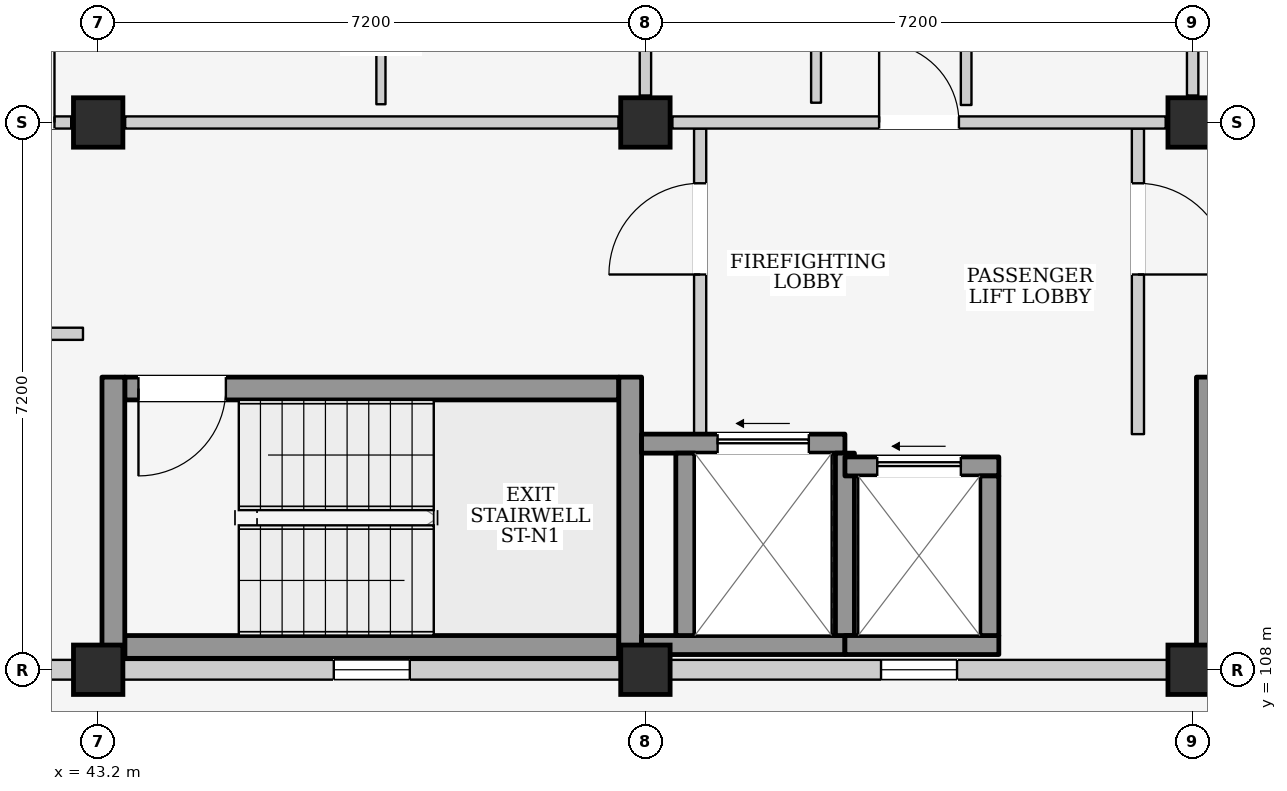
"""IFC4 building model, lengths in metres.
Left out: names, types, materials, properties, quantities, classifications, styles, units other than length and angle.
Written with IfcOpenShell. Run it as: python <this file> out.ifc"""

import sys

from ifc_helpers import new_model, si_unit, direction, frame, frame_2d, origin, origin_2d, place, context, subcontext, project, spatial, rectangle, extrude, element, fill, save


model = new_model("IFC4")
c1 = context("Model", 3, precision=1e-05, world=origin(), true_north=direction((0.0, 1.0)))
c2 = subcontext(c1, "Body", "Model", "MODEL_VIEW")
j1 = project(units=[si_unit("LENGTHUNIT", "METRE"), si_unit("PLANEANGLEUNIT", "RADIAN")], contexts=[c1])
p1 = place(None, origin())
s1 = spatial("IfcSite", under=j1, at=p1, CompositionType="ELEMENT")
p2 = place(p1, origin())
s2 = spatial("IfcBuilding", under=s1, at=p2, CompositionType="ELEMENT")
p3 = place(p2, frame((0.0, 0.0, 18.6)))
s3 = spatial("IfcBuildingStorey", under=s2, at=p3, CompositionType="ELEMENT", Elevation=18.6)
for number, where, z_axis, x_axis in (
    (1, (43.2, 108.0, 0.0), (0.0, 0.0, 1.0), (1.0, 0.0, 0.0)),
    (2, (43.2, 115.2, 0.0), (0.0, 0.0, 1.0), (1.0, 0.0, 0.0)),
    (3, (50.4, 108.0, 0.0), (0.0, 0.0, 1.0), (1.0, 0.0, 0.0)),
    (4, (50.4, 115.2, 0.0), (0.0, 0.0, 1.0), (1.0, 0.0, 0.0)),
    (5, (57.6, 108.0, 0.0), (0.0, 0.0, 1.0), (1.0, 0.0, 0.0)),
    (6, (57.6, 115.2, 0.0), (0.0, 0.0, 1.0), (1.0, 0.0, 0.0)),
):
    element("IfcColumn", number, at=place(p3, frame(where, z_axis=z_axis, x_axis=x_axis)), inside=s3, PredefinedType="COLUMN", context=c2, shape_type="SweptSolid", body=[
        extrude(rectangle(XDim=0.65, YDim=0.65, at=origin_2d()), origin(), (0.0, 0.0, 1.0), 3.3),
    ])
p4 = place(p3, frame((36.325, 108.0, 0.0), z_axis=(0.0, 0.0, 1.0), x_axis=(1.0, 0.0, 0.0)))
e7 = element("IfcWall", 7, at=p4, inside=s3, PredefinedType="ELEMENTEDWALL", context=c2, shape_type="SweptSolid", body=[
    extrude(rectangle(XDim=6.55, YDim=0.26, at=frame_2d((3.275, 0.0))), origin(), (0.0, 0.0, 1.0), 2.395),
])
p5 = place(p4, frame((2.525, 0.0, 0.0)))
e8 = element("IfcOpeningElement", 8, at=p5, cuts=e7, PredefinedType="OPENING", context=c2, shape_type="SweptSolid", body=[
    extrude(rectangle(XDim=1.5, YDim=2.12, at=frame_2d((0.75, 1.06))), frame((0.0, 0.145, 0.0), z_axis=(0.0, -1.0, 0.0), x_axis=(1.0, 0.0, 0.0)), (0.0, 0.0, 1.0), 0.29),
])
p6 = place(p3, frame((43.525, 108.0, 0.0), z_axis=(0.0, 0.0, 1.0), x_axis=(1.0, 0.0, 0.0)))
e9 = element("IfcWall", 9, at=p6, inside=s3, PredefinedType="ELEMENTEDWALL", context=c2, shape_type="SweptSolid", body=[
    extrude(rectangle(XDim=6.55, YDim=0.26, at=frame_2d((3.275, 0.0))), origin(), (0.0, 0.0, 1.0), 2.395),
])
p7 = place(p6, frame((2.775, 0.0, 1.2)))
e10 = element("IfcOpeningElement", 10, at=p7, cuts=e9, PredefinedType="OPENING", context=c2, shape_type="SweptSolid", body=[
    extrude(rectangle(XDim=1.0, YDim=0.9, at=frame_2d((0.5, 0.45))), frame((0.0, 0.145, 0.0), z_axis=(0.0, -1.0, 0.0), x_axis=(1.0, 0.0, 0.0)), (0.0, 0.0, 1.0), 0.29),
])
p8 = place(p3, frame((50.725, 108.0, 0.0), z_axis=(0.0, 0.0, 1.0), x_axis=(1.0, 0.0, 0.0)))
e11 = element("IfcWall", 11, at=p8, inside=s3, PredefinedType="ELEMENTEDWALL", context=c2, shape_type="SweptSolid", body=[
    extrude(rectangle(XDim=6.55, YDim=0.26, at=frame_2d((3.275, 0.0))), origin(), (0.0, 0.0, 1.0), 2.395),
])
p9 = place(p8, frame((2.775, 0.0, 1.2)))
e12 = element("IfcOpeningElement", 12, at=p9, cuts=e11, PredefinedType="OPENING", context=c2, shape_type="SweptSolid", body=[
    extrude(rectangle(XDim=1.0, YDim=0.9, at=frame_2d((0.5, 0.45))), frame((0.0, 0.145, 0.0), z_axis=(0.0, -1.0, 0.0), x_axis=(1.0, 0.0, 0.0)), (0.0, 0.0, 1.0), 0.29),
])
p10 = place(p3, frame((43.55, 108.3, 0.0), z_axis=(0.0, 0.0, 1.0), x_axis=(1.0, 0.0, 0.0)))
e13 = element("IfcWall", 13, at=p10, inside=s3, PredefinedType="SHEAR", context=c2, shape_type="SweptSolid", body=[
    extrude(rectangle(XDim=6.5, YDim=0.3, at=frame_2d((3.25, 0.0))), origin(), (0.0, 0.0, 1.0), 3.06),
])
p11 = place(p3, frame((43.55, 111.7, 0.0), z_axis=(0.0, 0.0, 1.0), x_axis=(1.0, 0.0, 0.0)))
e14 = element("IfcWall", 14, at=p11, inside=s3, PredefinedType="SHEAR", context=c2, shape_type="SweptSolid", body=[
    extrude(rectangle(XDim=6.5, YDim=0.3, at=frame_2d((3.25, 0.0))), origin(), (0.0, 0.0, 1.0), 3.06),
])
p12 = place(p11, frame((0.18, 0.0, 0.0)))
e15 = element("IfcOpeningElement", 15, at=p12, cuts=e14, PredefinedType="OPENING", context=c2, shape_type="SweptSolid", body=[
    extrude(rectangle(XDim=1.15, YDim=2.2, at=frame_2d((0.575, 1.1))), frame((0.0, 0.165, 0.0), z_axis=(0.0, -1.0, 0.0), x_axis=(1.0, 0.0, 0.0)), (0.0, 0.0, 1.0), 0.33),
])
for number, where, z_axis, x_axis in (
    (16, (43.4, 108.15, 0.0), (0.0, 0.0, 1.0), (0.0, 1.0, 0.0)),
    (17, (50.2, 108.15, 0.0), (0.0, 0.0, 1.0), (0.0, 1.0, 0.0)),
):
    element("IfcWall", number, at=place(p3, frame(where, z_axis=z_axis, x_axis=x_axis)), inside=s3, PredefinedType="SHEAR", context=c2, shape_type="SweptSolid", body=[
        extrude(rectangle(XDim=3.7, YDim=0.3, at=frame_2d((1.85, 0.0))), origin(), (0.0, 0.0, 1.0), 3.06),
    ])
p13 = place(p3, frame((51.12, 111.1, 0.0), z_axis=(0.0, 0.0, 1.0), x_axis=(0.0, 1.0, 0.0)))
e18 = element("IfcWall", 18, at=p13, inside=s3, PredefinedType="PARTITIONING", context=c2, shape_type="SweptSolid", body=[
    extrude(rectangle(XDim=4.02, YDim=0.16, at=frame_2d((2.01, 0.0))), origin(), (0.0, 0.0, 1.0), 3.06),
])
p14 = place(p13, frame((2.1, 0.0, 0.0)))
e19 = element("IfcOpeningElement", 19, at=p14, cuts=e18, PredefinedType="OPENING", context=c2, shape_type="SweptSolid", body=[
    extrude(rectangle(XDim=1.2, YDim=2.2, at=frame_2d((0.6, 1.1))), frame((0.0, 0.095, 0.0), z_axis=(0.0, -1.0, 0.0), x_axis=(1.0, 0.0, 0.0)), (0.0, 0.0, 1.0), 0.19),
])
p15 = place(p3, frame((56.88, 111.1, 0.0), z_axis=(0.0, 0.0, 1.0), x_axis=(0.0, 1.0, 0.0)))
e20 = element("IfcWall", 20, at=p15, inside=s3, PredefinedType="PARTITIONING", context=c2, shape_type="SweptSolid", body=[
    extrude(rectangle(XDim=4.02, YDim=0.16, at=frame_2d((2.01, 0.0))), origin(), (0.0, 0.0, 1.0), 3.06),
])
p16 = place(p15, frame((2.1, 0.0, 0.0)))
e21 = element("IfcOpeningElement", 21, at=p16, cuts=e20, PredefinedType="OPENING", context=c2, shape_type="SweptSolid", body=[
    extrude(rectangle(XDim=1.2, YDim=2.2, at=frame_2d((0.6, 1.1))), frame((0.0, 0.095, 0.0), z_axis=(0.0, -1.0, 0.0), x_axis=(1.0, 0.0, 0.0)), (0.0, 0.0, 1.0), 0.19),
])
p17 = place(p3, frame((50.35, 108.325, 0.0), z_axis=(0.0, 0.0, 1.0), x_axis=(1.0, 0.0, 0.0)))
e22 = element("IfcWall", 22, at=p17, inside=s3, PredefinedType="SHEAR", context=c2, shape_type="SweptSolid", body=[
    extrude(rectangle(XDim=2.675, YDim=0.25, at=frame_2d((1.337, 0.0))), origin(), (0.0, 0.0, 1.0), 3.06),
])
p18 = place(p3, frame((50.35, 110.975, 0.0), z_axis=(0.0, 0.0, 1.0), x_axis=(1.0, 0.0, 0.0)))
e23 = element("IfcWall", 23, at=p18, inside=s3, PredefinedType="SHEAR", context=c2, shape_type="SweptSolid", body=[
    extrude(rectangle(XDim=2.675, YDim=0.25, at=frame_2d((1.337, 0.0))), origin(), (0.0, 0.0, 1.0), 3.06),
])
p19 = place(p18, frame((1.0, 0.0, 0.0)))
e24 = element("IfcOpeningElement", 24, at=p19, cuts=e23, PredefinedType="OPENING", context=c2, shape_type="SweptSolid", body=[
    extrude(rectangle(XDim=1.2, YDim=2.25, at=frame_2d((0.6, 1.125))), frame((0.0, 0.14, 0.0), z_axis=(0.0, -1.0, 0.0), x_axis=(1.0, 0.0, 0.0)), (0.0, 0.0, 1.0), 0.28),
])
for number, where, z_axis, x_axis in (
    (25, (50.925, 108.45, 0.0), (0.0, 0.0, 1.0), (0.0, 1.0, 0.0)),
    (26, (53.025, 108.45, 0.0), (0.0, 0.0, 1.0), (0.0, 1.0, 0.0)),
):
    element("IfcWall", number, at=place(p3, frame(where, z_axis=z_axis, x_axis=x_axis)), inside=s3, PredefinedType="SHEAR", context=c2, shape_type="SweptSolid", body=[
        extrude(rectangle(XDim=2.4, YDim=0.25, at=frame_2d((1.2, 0.0))), origin(), (0.0, 0.0, 1.0), 3.06),
    ])
p20 = place(p3, frame((53.025, 108.325, 0.0), z_axis=(0.0, 0.0, 1.0), x_axis=(1.0, 0.0, 0.0)))
e27 = element("IfcWall", 27, at=p20, inside=s3, PredefinedType="SHEAR", context=c2, shape_type="SweptSolid", body=[
    extrude(rectangle(XDim=2.025, YDim=0.25, at=frame_2d((1.013, 0.0))), origin(), (0.0, 0.0, 1.0), 3.06),
])
p21 = place(p3, frame((53.025, 110.675, 0.0), z_axis=(0.0, 0.0, 1.0), x_axis=(1.0, 0.0, 0.0)))
e28 = element("IfcWall", 28, at=p21, inside=s3, PredefinedType="SHEAR", context=c2, shape_type="SweptSolid", body=[
    extrude(rectangle(XDim=2.025, YDim=0.25, at=frame_2d((1.013, 0.0))), origin(), (0.0, 0.0, 1.0), 3.06),
])
p22 = place(p21, frame((0.425, 0.0, 0.0)))
e29 = element("IfcOpeningElement", 29, at=p22, cuts=e28, PredefinedType="OPENING", context=c2, shape_type="SweptSolid", body=[
    extrude(rectangle(XDim=1.1, YDim=2.15, at=frame_2d((0.55, 1.075))), frame((0.0, 0.14, 0.0), z_axis=(0.0, -1.0, 0.0), x_axis=(1.0, 0.0, 0.0)), (0.0, 0.0, 1.0), 0.28),
])
p23 = place(p3, frame((54.925, 108.45, 0.0), z_axis=(0.0, 0.0, 1.0), x_axis=(0.0, 1.0, 0.0)))
e30 = element("IfcWall", 30, at=p23, inside=s3, PredefinedType="SHEAR", context=c2, shape_type="SweptSolid", body=[
    extrude(rectangle(XDim=2.1, YDim=0.25, at=frame_2d((1.05, 0.0))), origin(), (0.0, 0.0, 1.0), 3.06),
])
p24 = place(p3, frame((57.8, 108.15, 0.0), z_axis=(0.0, 0.0, 1.0), x_axis=(0.0, 1.0, 0.0)))
e31 = element("IfcWall", 31, at=p24, inside=s3, PredefinedType="SHEAR", context=c2, shape_type="SweptSolid", body=[
    extrude(rectangle(XDim=3.7, YDim=0.3, at=frame_2d((1.85, 0.0))), origin(), (0.0, 0.0, 1.0), 3.06),
])
p25 = place(p3, frame((36.355, 115.2, 0.0), z_axis=(0.0, 0.0, 1.0), x_axis=(1.0, 0.0, 0.0)))
e32 = element("IfcWall", 32, at=p25, inside=s3, PredefinedType="PARTITIONING", context=c2, shape_type="SweptSolid", body=[
    extrude(rectangle(XDim=6.49, YDim=0.16, at=frame_2d((3.245, 0.0))), origin(), (0.0, 0.0, 1.0), 2.395),
])
p26 = place(p25, frame((5.22, 0.0, 0.0)))
e33 = element("IfcOpeningElement", 33, at=p26, cuts=e32, PredefinedType="OPENING", context=c2, shape_type="SweptSolid", body=[
    extrude(rectangle(XDim=1.05, YDim=2.15, at=frame_2d((0.525, 1.075))), frame((0.0, 0.095, 0.0), z_axis=(0.0, -1.0, 0.0), x_axis=(1.0, 0.0, 0.0)), (0.0, 0.0, 1.0), 0.19),
])
p27 = place(p3, frame((43.555, 115.2, 0.0), z_axis=(0.0, 0.0, 1.0), x_axis=(1.0, 0.0, 0.0)))
e34 = element("IfcWall", 34, at=p27, inside=s3, PredefinedType="PARTITIONING", context=c2, shape_type="SweptSolid", body=[
    extrude(rectangle(XDim=6.49, YDim=0.16, at=frame_2d((3.245, 0.0))), origin(), (0.0, 0.0, 1.0), 2.395),
])
p28 = place(p3, frame((50.4, 115.555, 0.0), z_axis=(0.0, 0.0, 1.0), x_axis=(0.0, 1.0, 0.0)))
e35 = element("IfcWall", 35, at=p28, inside=s3, PredefinedType="PARTITIONING", context=c2, shape_type="SweptSolid", body=[
    extrude(rectangle(XDim=6.49, YDim=0.15, at=frame_2d((3.245, 0.0))), origin(), (0.0, 0.0, 1.0), 2.545),
])
p29 = place(p3, frame((46.92, 115.44, 0.0), z_axis=(0.0, 0.0, 1.0), x_axis=(0.0, 1.0, 0.0)))
e36 = element("IfcWall", 36, at=p29, inside=s3, PredefinedType="PARTITIONING", context=c2, shape_type="SweptSolid", body=[
    extrude(rectangle(XDim=3.04, YDim=0.12, at=frame_2d((1.52, 0.0))), origin(), (0.0, 0.0, 1.0), 3.06),
])
p30 = place(p29, frame((1.04, 0.0, 0.0)))
e37 = element("IfcOpeningElement", 37, at=p30, cuts=e36, PredefinedType="OPENING", context=c2, shape_type="SweptSolid", body=[
    extrude(rectangle(XDim=0.96, YDim=2.15, at=frame_2d((0.48, 1.075))), frame((0.0, 0.075, 0.0), z_axis=(0.0, -1.0, 0.0), x_axis=(1.0, 0.0, 0.0)), (0.0, 0.0, 1.0), 0.15),
])
p31 = place(p3, frame((50.755, 115.2, 0.0), z_axis=(0.0, 0.0, 1.0), x_axis=(1.0, 0.0, 0.0)))
e38 = element("IfcWall", 38, at=p31, inside=s3, PredefinedType="PARTITIONING", context=c2, shape_type="SweptSolid", body=[
    extrude(rectangle(XDim=6.49, YDim=0.16, at=frame_2d((3.245, 0.0))), origin(), (0.0, 0.0, 1.0), 2.395),
])
p32 = place(p31, frame((2.72, 0.0, 0.0)))
e39 = element("IfcOpeningElement", 39, at=p32, cuts=e38, PredefinedType="OPENING", context=c2, shape_type="SweptSolid", body=[
    extrude(rectangle(XDim=1.05, YDim=2.15, at=frame_2d((0.525, 1.075))), frame((0.0, 0.095, 0.0), z_axis=(0.0, -1.0, 0.0), x_axis=(1.0, 0.0, 0.0)), (0.0, 0.0, 1.0), 0.19),
])
p33 = place(p3, frame((57.6, 115.555, 0.0), z_axis=(0.0, 0.0, 1.0), x_axis=(0.0, 1.0, 0.0)))
e40 = element("IfcWall", 40, at=p33, inside=s3, PredefinedType="PARTITIONING", context=c2, shape_type="SweptSolid", body=[
    extrude(rectangle(XDim=6.49, YDim=0.15, at=frame_2d((3.245, 0.0))), origin(), (0.0, 0.0, 1.0), 2.545),
])
p34 = place(p3, frame((52.645, 115.46, 0.0), z_axis=(0.0, 0.0, 1.0), x_axis=(0.0, 1.0, 0.0)))
e41 = element("IfcWall", 41, at=p34, inside=s3, PredefinedType="PARTITIONING", context=c2, shape_type="SweptSolid", body=[
    extrude(rectangle(XDim=2.13, YDim=0.13, at=frame_2d((1.065, 0.0))), origin(), (0.0, 0.0, 1.0), 3.06),
])
p35 = place(p3, frame((54.62, 115.43, 0.0), z_axis=(0.0, 0.0, 1.0), x_axis=(0.0, 1.0, 0.0)))
e42 = element("IfcWall", 42, at=p35, inside=s3, PredefinedType="PARTITIONING", context=c2, shape_type="SweptSolid", body=[
    extrude(rectangle(XDim=2.15, YDim=0.14, at=frame_2d((1.075, 0.0))), origin(), (0.0, 0.0, 1.0), 3.06),
])
p36 = place(p3, frame((36.2, 112.42, 0.0), z_axis=(0.0, 0.0, 1.0), x_axis=(1.0, 0.0, 0.0)))
e43 = element("IfcWall", 43, at=p36, inside=s3, PredefinedType="PARTITIONING", context=c2, shape_type="SweptSolid", body=[
    extrude(rectangle(XDim=6.8, YDim=0.16, at=frame_2d((3.4, 0.0))), origin(), (0.0, 0.0, 1.0), 3.06),
])
p37 = place(p36, frame((2.93, 0.0, 0.0)))
e44 = element("IfcOpeningElement", 44, at=p37, cuts=e43, PredefinedType="OPENING", context=c2, shape_type="SweptSolid", body=[
    extrude(rectangle(XDim=0.94, YDim=2.12, at=frame_2d((0.47, 1.06))), frame((0.0, 0.095, 0.0), z_axis=(0.0, -1.0, 0.0), x_axis=(1.0, 0.0, 0.0)), (0.0, 0.0, 1.0), 0.19),
])
p38 = place(p7, origin())
e45 = element("IfcWindow", 45, at=p38, inside=s3, PartitioningType="SINGLE_PANEL", PredefinedType="WINDOW", context=c2, shape_type="SweptSolid", body=[
    extrude(rectangle(XDim=1.0, YDim=0.9, at=frame_2d((0.5, 0.45))), frame((0.0, 0.03, 0.0), z_axis=(0.0, -1.0, 0.0), x_axis=(1.0, 0.0, 0.0)), (0.0, 0.0, 1.0), 0.06),
])
fill(e10, e45)
p39 = place(p9, origin())
e46 = element("IfcWindow", 46, at=p39, inside=s3, PartitioningType="SINGLE_PANEL", PredefinedType="WINDOW", context=c2, shape_type="SweptSolid", body=[
    extrude(rectangle(XDim=1.0, YDim=0.9, at=frame_2d((0.5, 0.45))), frame((0.0, 0.03, 0.0), z_axis=(0.0, -1.0, 0.0), x_axis=(1.0, 0.0, 0.0)), (0.0, 0.0, 1.0), 0.06),
])
fill(e12, e46)
p40 = place(p12, frame((1.15, 0.0, 0.0), z_axis=(0.0, 0.0, 1.0), x_axis=(-1.0, 0.0, 0.0)))
e47 = element("IfcDoor", 47, at=p40, inside=s3, OperationType="SINGLE_SWING_RIGHT", PredefinedType="DOOR", context=c2, shape_type="SweptSolid", body=[
    extrude(rectangle(XDim=1.15, YDim=2.2, at=frame_2d((0.575, 1.1))), frame((0.0, 0.025, 0.0), z_axis=(0.0, -1.0, 0.0), x_axis=(1.0, 0.0, 0.0)), (0.0, 0.0, 1.0), 0.05),
])
fill(e15, e47)
p41 = place(p14, origin())
e48 = element("IfcDoor", 48, at=p41, inside=s3, OperationType="SINGLE_SWING_LEFT", PredefinedType="DOOR", context=c2, shape_type="SweptSolid", body=[
    extrude(rectangle(XDim=1.2, YDim=2.2, at=frame_2d((0.6, 1.1))), frame((0.0, 0.025, 0.0), z_axis=(0.0, -1.0, 0.0), x_axis=(1.0, 0.0, 0.0)), (0.0, 0.0, 1.0), 0.05),
])
fill(e19, e48)
p42 = place(p16, frame((1.2, 0.0, 0.0), z_axis=(0.0, 0.0, 1.0), x_axis=(-1.0, 0.0, 0.0)))
e49 = element("IfcDoor", 49, at=p42, inside=s3, OperationType="SINGLE_SWING_RIGHT", PredefinedType="DOOR", context=c2, shape_type="SweptSolid", body=[
    extrude(rectangle(XDim=1.2, YDim=2.2, at=frame_2d((0.6, 1.1))), frame((0.0, 0.025, 0.0), z_axis=(0.0, -1.0, 0.0), x_axis=(1.0, 0.0, 0.0)), (0.0, 0.0, 1.0), 0.05),
])
fill(e21, e49)
p43 = place(p19, origin())
e50 = element("IfcDoor", 50, at=p43, inside=s3, OperationType="SLIDING_TO_LEFT", PredefinedType="DOOR", context=c2, shape_type="SweptSolid", body=[
    extrude(rectangle(XDim=1.2, YDim=2.25, at=frame_2d((0.6, 1.125))), frame((0.0, 0.025, 0.0), z_axis=(0.0, -1.0, 0.0), x_axis=(1.0, 0.0, 0.0)), (0.0, 0.0, 1.0), 0.05),
])
fill(e24, e50)
p44 = place(p22, origin())
e51 = element("IfcDoor", 51, at=p44, inside=s3, OperationType="SLIDING_TO_LEFT", PredefinedType="DOOR", context=c2, shape_type="SweptSolid", body=[
    extrude(rectangle(XDim=1.1, YDim=2.15, at=frame_2d((0.55, 1.075))), frame((0.0, 0.025, 0.0), z_axis=(0.0, -1.0, 0.0), x_axis=(1.0, 0.0, 0.0)), (0.0, 0.0, 1.0), 0.05),
])
fill(e29, e51)
p45 = place(p26, origin())
e52 = element("IfcDoor", 52, at=p45, inside=s3, OperationType="SINGLE_SWING_RIGHT", PredefinedType="DOOR", context=c2, shape_type="SweptSolid", body=[
    extrude(rectangle(XDim=1.05, YDim=2.15, at=frame_2d((0.525, 1.075))), frame((0.0, 0.025, 0.0), z_axis=(0.0, -1.0, 0.0), x_axis=(1.0, 0.0, 0.0)), (0.0, 0.0, 1.0), 0.05),
])
fill(e33, e52)
p46 = place(p32, origin())
e53 = element("IfcDoor", 53, at=p46, inside=s3, OperationType="SINGLE_SWING_LEFT", PredefinedType="DOOR", context=c2, shape_type="SweptSolid", body=[
    extrude(rectangle(XDim=1.05, YDim=2.15, at=frame_2d((0.525, 1.075))), frame((0.0, 0.025, 0.0), z_axis=(0.0, -1.0, 0.0), x_axis=(1.0, 0.0, 0.0)), (0.0, 0.0, 1.0), 0.05),
])
fill(e39, e53)
save(model, sys.argv[1])
